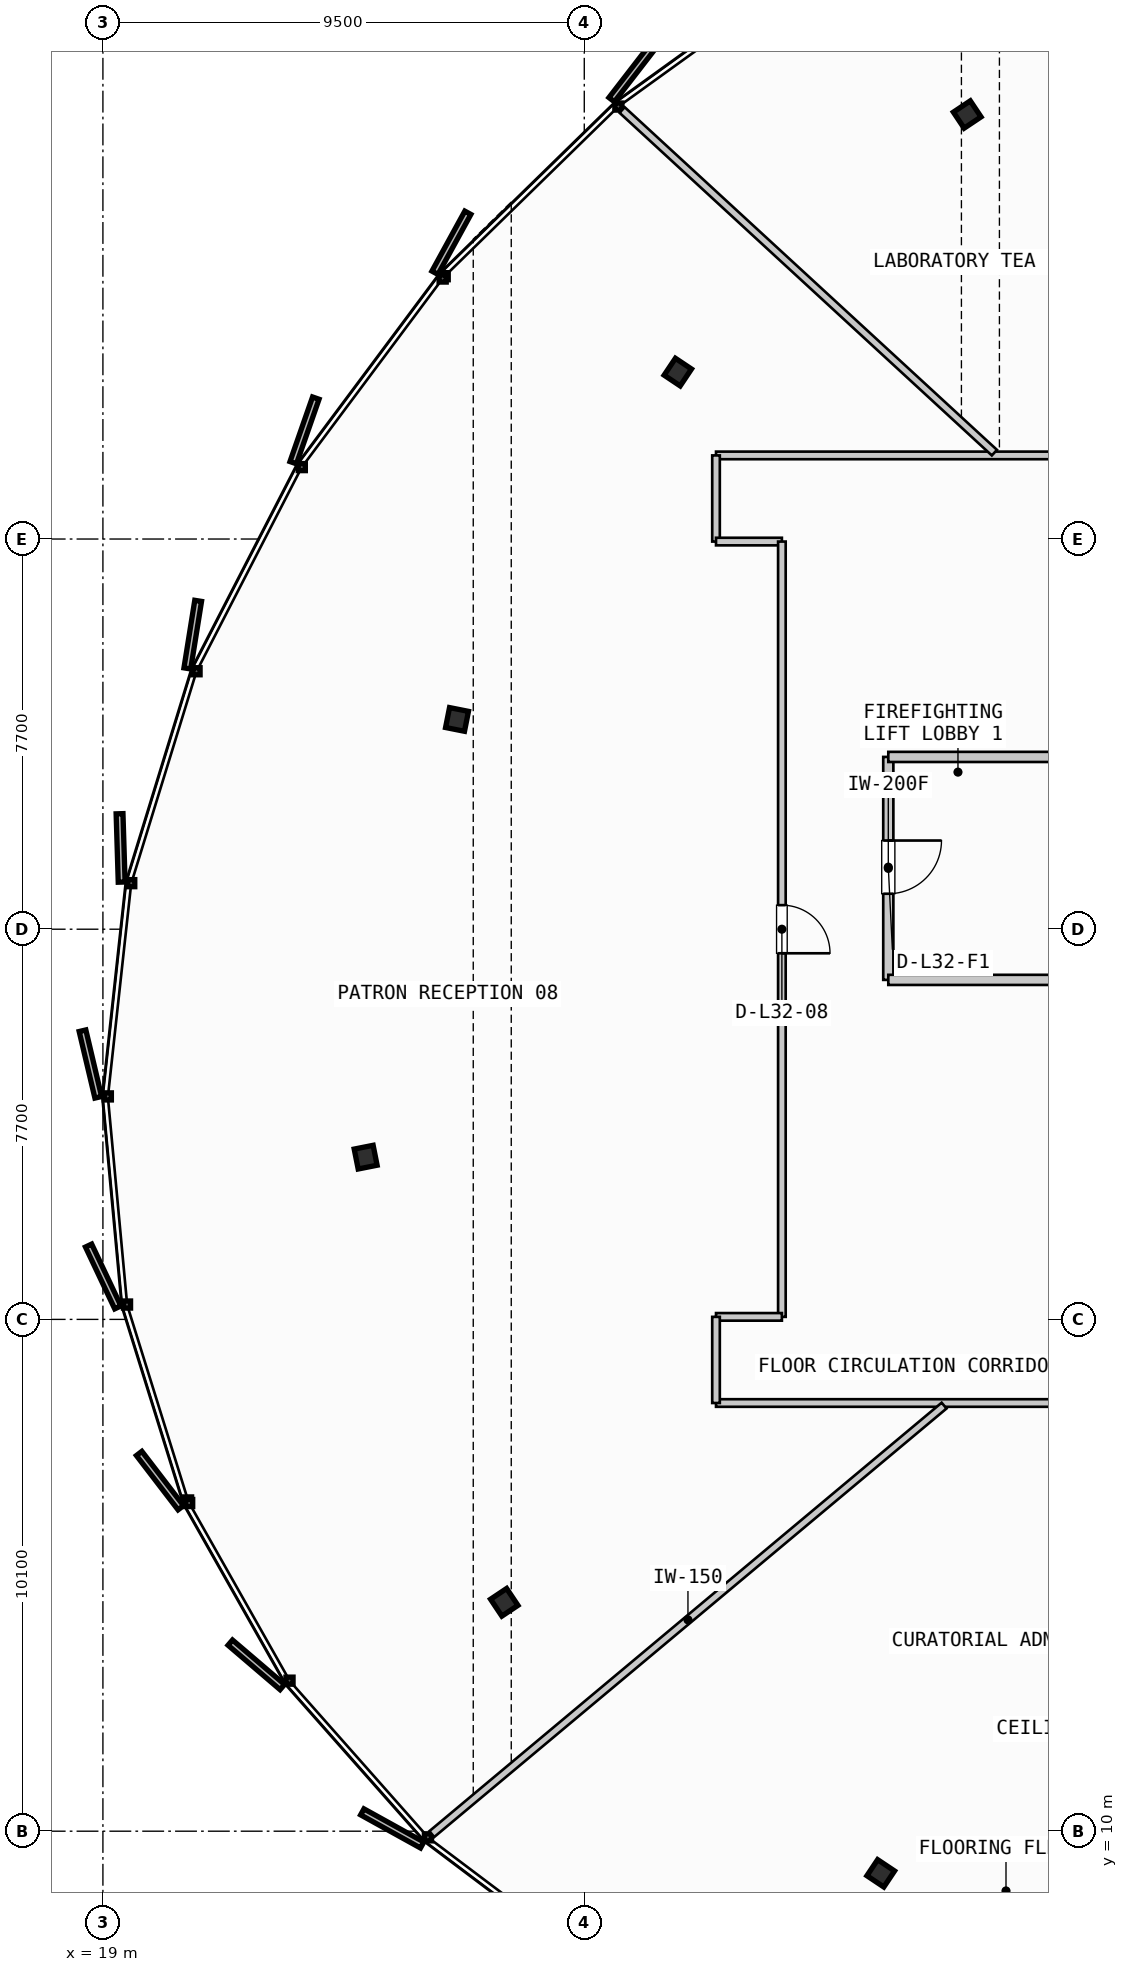
"""IFC4 building model, lengths in metres.
Left out: names, types, materials, properties, quantities, classifications, styles, units other than length and angle.
Written with IfcOpenShell. Run it as: python <this file> out.ifc"""

import sys

from ifc_helpers import new_model, si_unit, direction, frame, frame_2d, origin, origin_2d, place, context, subcontext, project, spatial, rectangle, i_section, extrude, source, transform, mapped, element, fill, save


model = new_model("IFC4")
c1 = context("Model", 3, precision=1e-05, world=origin(), true_north=direction((0.0, 1.0)))
c2 = subcontext(c1, "Body", "Model", "MODEL_VIEW")
j1 = project(units=[si_unit("LENGTHUNIT", "METRE"), si_unit("PLANEANGLEUNIT", "RADIAN")], contexts=[c1])
p1 = place(None, origin())
s1 = spatial("IfcSite", under=j1, at=p1, CompositionType="ELEMENT")
p2 = place(p1, origin())
s2 = spatial("IfcBuilding", under=s1, at=p2, CompositionType="ELEMENT")
p3 = place(p2, frame((0.0, 0.0, 128.8)))
s3 = spatial("IfcBuildingStorey", under=s2, at=p3, CompositionType="ELEMENT", Elevation=128.8)
m1 = source(origin(), c2, "Body", "SweptSolid", [
    extrude(i_section(OverallWidth=0.401, OverallDepth=0.381, WebThickness=0.032, FlangeThickness=0.051, FilletRadius=0.015, at=origin_2d()), origin(), (0.0, 0.0, 1.0), 3.3),
])
for number, where, z_axis, x_axis in (
    (1, (36.058, 43.877, 0.0), (0.0, 0.0, 1.0), (-0.556, 0.831, 0.0)),
    (2, (30.346, 38.794, 0.0), (0.0, 0.0, 1.0), (-0.831, 0.556, 0.0)),
    (3, (25.989, 31.94, 0.0), (0.0, 0.0, 1.0), (-0.981, 0.195, 0.0)),
    (4, (24.185, 23.302, 0.0), (0.0, 0.0, 1.0), (-0.981, -0.195, 0.0)),
    (5, (26.921, 14.517, 0.0), (0.0, 0.0, 1.0), (-0.831, -0.556, 0.0)),
    (6, (34.351, 9.168, 0.0), (0.0, 0.0, 1.0), (-0.556, -0.831, 0.0)),
):
    element("IfcColumn", number, at=place(p3, frame(where, z_axis=z_axis, x_axis=x_axis)), inside=s3, PredefinedType="COLUMN", context=c2, shape_type="MappedRepresentation", body=[
        mapped(m1, transform((0.0, 0.0, 0.0), scale=1.0)),
    ])
p4 = place(p3, frame((34.5, 31.2, 0.0), z_axis=(0.0, 0.0, 1.0), x_axis=(0.0, -1.0, 0.0)))
e7 = element("IfcWall", 7, at=p4, inside=s3, PredefinedType="PARTITIONING", context=c2, shape_type="SweptSolid", body=[
    extrude(rectangle(XDim=4.4, YDim=0.2, at=frame_2d((2.2, 0.0))), origin(), (0.0, 0.0, 1.0), 2.445),
])
p5 = place(p4, frame((1.65, 0.0, 0.0)))
e8 = element("IfcOpeningElement", 8, at=p5, cuts=e7, PredefinedType="OPENING", context=c2, shape_type="SweptSolid", body=[
    extrude(rectangle(XDim=1.05, YDim=2.15, at=frame_2d((0.525, 1.075))), frame((0.0, 0.11, 0.0), z_axis=(0.0, -1.0, 0.0), x_axis=(1.0, 0.0, 0.0)), (0.0, 0.0, 1.0), 0.22),
])
for number, where, z_axis, x_axis in (
    (9, (34.5, 26.8, 0.0), (0.0, 0.0, 1.0), (1.0, 0.0, 0.0)),
    (10, (34.5, 31.2, 0.0), (0.0, 0.0, 1.0), (1.0, 0.0, 0.0)),
):
    element("IfcWall", number, at=place(p3, frame(where, z_axis=z_axis, x_axis=x_axis)), inside=s3, PredefinedType="PARTITIONING", context=c2, shape_type="SweptSolid", body=[
        extrude(rectangle(XDim=3.215, YDim=0.2, at=frame_2d((1.607, 0.0))), origin(), (0.0, 0.0, 1.0), 2.445),
    ])
p6 = place(p3, frame((31.1, 18.45, 0.0), z_axis=(0.0, 0.0, 1.0), x_axis=(1.0, 0.0, 0.0)))
e11 = element("IfcWall", 11, at=p6, inside=s3, PredefinedType="PARTITIONING", context=c2, shape_type="SweptSolid", body=[
    extrude(rectangle(XDim=31.4, YDim=0.15, at=frame_2d((15.7, 0.0))), origin(), (0.0, 0.0, 1.0), 2.445),
])
p7 = place(p6, frame((9.534, 0.0, 0.0)))
e12 = element("IfcOpeningElement", 12, at=p7, cuts=e11, PredefinedType="OPENING", context=c2, shape_type="SweptSolid", body=[
    extrude(rectangle(XDim=0.95, YDim=2.15, at=frame_2d((0.475, 1.075))), frame((0.0, 0.085, 0.0), z_axis=(0.0, -1.0, 0.0), x_axis=(1.0, 0.0, 0.0)), (0.0, 0.0, 1.0), 0.17),
])
p8 = place(p6, frame((20.343, 0.0, 0.0)))
e13 = element("IfcOpeningElement", 13, at=p8, cuts=e11, PredefinedType="OPENING", context=c2, shape_type="SweptSolid", body=[
    extrude(rectangle(XDim=0.95, YDim=2.15, at=frame_2d((0.475, 1.075))), frame((0.0, 0.085, 0.0), z_axis=(0.0, -1.0, 0.0), x_axis=(1.0, 0.0, 0.0)), (0.0, 0.0, 1.0), 0.17),
])
p9 = place(p3, frame((62.5, 37.15, 0.0), z_axis=(0.0, 0.0, 1.0), x_axis=(-1.0, 0.0, 0.0)))
e14 = element("IfcWall", 14, at=p9, inside=s3, PredefinedType="PARTITIONING", context=c2, shape_type="SweptSolid", body=[
    extrude(rectangle(XDim=31.4, YDim=0.15, at=frame_2d((15.7, 0.0))), origin(), (0.0, 0.0, 1.0), 2.445),
])
p10 = place(p9, frame((5.711, 0.0, 0.0)))
e15 = element("IfcOpeningElement", 15, at=p10, cuts=e14, PredefinedType="OPENING", context=c2, shape_type="SweptSolid", body=[
    extrude(rectangle(XDim=0.95, YDim=2.15, at=frame_2d((0.475, 1.075))), frame((0.0, 0.085, 0.0), z_axis=(0.0, -1.0, 0.0), x_axis=(1.0, 0.0, 0.0)), (0.0, 0.0, 1.0), 0.17),
])
p11 = place(p9, frame((15.295, 0.0, 0.0)))
e16 = element("IfcOpeningElement", 16, at=p11, cuts=e14, PredefinedType="OPENING", context=c2, shape_type="SweptSolid", body=[
    extrude(rectangle(XDim=0.95, YDim=2.15, at=frame_2d((0.475, 1.075))), frame((0.0, 0.085, 0.0), z_axis=(0.0, -1.0, 0.0), x_axis=(1.0, 0.0, 0.0)), (0.0, 0.0, 1.0), 0.17),
])
p12 = place(p9, frame((22.388, 0.0, 0.0)))
e17 = element("IfcOpeningElement", 17, at=p12, cuts=e14, PredefinedType="OPENING", context=c2, shape_type="SweptSolid", body=[
    extrude(rectangle(XDim=0.95, YDim=2.15, at=frame_2d((0.475, 1.075))), frame((0.0, 0.085, 0.0), z_axis=(0.0, -1.0, 0.0), x_axis=(1.0, 0.0, 0.0)), (0.0, 0.0, 1.0), 0.17),
])
p13 = place(p3, frame((31.1, 37.15, 0.0), z_axis=(0.0, 0.0, 1.0), x_axis=(0.0, -1.0, 0.0)))
e18 = element("IfcWall", 18, at=p13, inside=s3, PredefinedType="PARTITIONING", context=c2, shape_type="SweptSolid", body=[
    extrude(rectangle(XDim=1.7, YDim=0.15, at=frame_2d((0.85, 0.0))), origin(), (0.0, 0.0, 1.0), 2.445),
])
p14 = place(p3, frame((31.1, 35.45, 0.0), z_axis=(0.0, 0.0, 1.0), x_axis=(1.0, 0.0, 0.0)))
e19 = element("IfcWall", 19, at=p14, inside=s3, PredefinedType="PARTITIONING", context=c2, shape_type="SweptSolid", body=[
    extrude(rectangle(XDim=1.3, YDim=0.15, at=frame_2d((0.65, 0.0))), origin(), (0.0, 0.0, 1.0), 2.445),
])
p15 = place(p3, frame((32.4, 35.45, 0.0), z_axis=(0.0, 0.0, 1.0), x_axis=(0.0, -1.0, 0.0)))
e20 = element("IfcWall", 20, at=p15, inside=s3, PredefinedType="PARTITIONING", context=c2, shape_type="SweptSolid", body=[
    extrude(rectangle(XDim=15.3, YDim=0.15, at=frame_2d((7.65, 0.0))), origin(), (0.0, 0.0, 1.0), 2.445),
])
p16 = place(p15, frame((7.175, 0.0, 0.0)))
e21 = element("IfcOpeningElement", 21, at=p16, cuts=e20, PredefinedType="OPENING", context=c2, shape_type="SweptSolid", body=[
    extrude(rectangle(XDim=0.95, YDim=2.15, at=frame_2d((0.475, 1.075))), frame((0.0, 0.085, 0.0), z_axis=(0.0, -1.0, 0.0), x_axis=(1.0, 0.0, 0.0)), (0.0, 0.0, 1.0), 0.17),
])
p17 = place(p3, frame((32.4, 20.15, 0.0), z_axis=(0.0, 0.0, 1.0), x_axis=(-1.0, 0.0, 0.0)))
e22 = element("IfcWall", 22, at=p17, inside=s3, PredefinedType="PARTITIONING", context=c2, shape_type="SweptSolid", body=[
    extrude(rectangle(XDim=1.3, YDim=0.15, at=frame_2d((0.65, 0.0))), origin(), (0.0, 0.0, 1.0), 2.445),
])
p18 = place(p3, frame((31.1, 20.15, 0.0), z_axis=(0.0, 0.0, 1.0), x_axis=(0.0, -1.0, 0.0)))
e23 = element("IfcWall", 23, at=p18, inside=s3, PredefinedType="PARTITIONING", context=c2, shape_type="SweptSolid", body=[
    extrude(rectangle(XDim=1.7, YDim=0.15, at=frame_2d((0.85, 0.0))), origin(), (0.0, 0.0, 1.0), 2.445),
])
p19 = place(p3, frame((35.601, 18.399, 0.0), z_axis=(0.0, 0.0, 1.0), x_axis=(-0.767084328757, -0.641546282489, 0.0)))
e24 = element("IfcWall", 24, at=p19, inside=s3, PredefinedType="PARTITIONING", context=c2, shape_type="SweptSolid", body=[
    extrude(rectangle(XDim=13.18, YDim=0.15, at=frame_2d((6.59, 0.0))), origin(), (0.0, 0.0, 1.0), 2.445),
])
p20 = place(p3, frame((42.722, 37.223, 0.0), z_axis=(0.0, 0.0, 1.0), x_axis=(-0.396596155685, 0.917993185866, 0.0)))
e25 = element("IfcWall", 25, at=p20, inside=s3, PredefinedType="PARTITIONING", context=c2, shape_type="SweptSolid", body=[
    extrude(rectangle(XDim=12.937, YDim=0.15, at=frame_2d((6.468, 0.0))), origin(), (0.0, 0.0, 1.0), 2.445),
])
p21 = place(p3, frame((36.594, 37.204, 0.0), z_axis=(0.0, 0.0, 1.0), x_axis=(-0.735789683626, 0.67721011619, 0.0)))
e26 = element("IfcWall", 26, at=p21, inside=s3, PredefinedType="PARTITIONING", context=c2, shape_type="SweptSolid", body=[
    extrude(rectangle(XDim=9.986, YDim=0.15, at=frame_2d((4.993, 0.0))), origin(), (0.0, 0.0, 1.0), 2.445),
])
m2 = source(origin(), c2, "Body", "SweptSolid", [
    extrude(rectangle(XDim=1.05, YDim=2.15, at=frame_2d((0.525, 1.075))), frame((0.0, 0.025, 0.0), z_axis=(0.0, -1.0, 0.0), x_axis=(1.0, 0.0, 0.0)), (0.0, 0.0, 1.0), 0.05),
])
p22 = place(p5, origin())
e27 = element("IfcDoor", 27, at=p22, inside=s3, OperationType="SINGLE_SWING_LEFT", PredefinedType="DOOR", context=c2, shape_type="MappedRepresentation", body=[
    mapped(m2, transform((0.0, 0.0, 0.0), scale=1.0)),
])
fill(e8, e27)
m3 = source(origin(), c2, "Body", "SweptSolid", [
    extrude(rectangle(XDim=0.95, YDim=2.15, at=frame_2d((0.475, 1.075))), frame((0.0, 0.025, 0.0), z_axis=(0.0, -1.0, 0.0), x_axis=(1.0, 0.0, 0.0)), (0.0, 0.0, 1.0), 0.05),
])
p23 = place(p16, origin())
e28 = element("IfcDoor", 28, at=p23, inside=s3, OperationType="SINGLE_SWING_RIGHT", PredefinedType="DOOR", context=c2, shape_type="MappedRepresentation", body=[
    mapped(m3, transform((0.0, 0.0, 0.0), scale=1.0)),
])
fill(e21, e28)
save(model, sys.argv[1])
